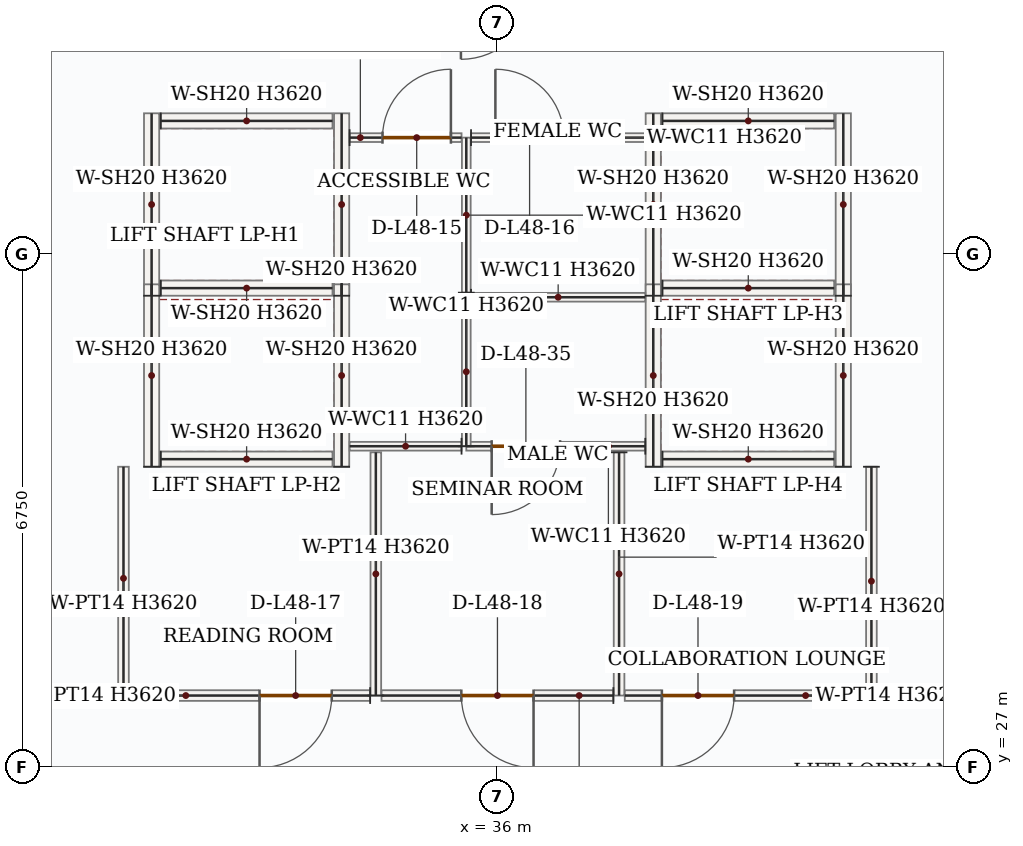
"""IFC4 building model, lengths in metres.
Left out: names, types, materials, properties, quantities, classifications, styles, units other than length and angle.
Written with IfcOpenShell. Run it as: python <this file> out.ifc"""

import sys

from ifc_helpers import new_model, si_unit, direction, frame, frame_2d, origin, place, context, subcontext, project, spatial, rectangle, extrude, source, transform, mapped, element, fill, save


model = new_model("IFC4")
c1 = context("Model", 3, precision=1e-05, world=origin(), true_north=direction((0.0, 1.0)))
c2 = subcontext(c1, "Body", "Model", "MODEL_VIEW")
j1 = project(units=[si_unit("LENGTHUNIT", "METRE"), si_unit("PLANEANGLEUNIT", "RADIAN")], contexts=[c1])
p1 = place(None, origin())
s1 = spatial("IfcSite", under=j1, at=p1, CompositionType="ELEMENT")
p2 = place(p1, origin())
s2 = spatial("IfcBuilding", under=s1, at=p2, CompositionType="ELEMENT")
p3 = place(p2, frame((0.0, 0.0, 205.8)))
s3 = spatial("IfcBuildingStorey", under=s2, at=p3, CompositionType="ELEMENT", Elevation=205.8)
m1 = source(origin(), c2, "Body", "SweptSolid", [
    extrude(rectangle(XDim=2.4, YDim=0.2, at=frame_2d((1.2, 0.0))), origin(), (0.0, 0.0, 1.0), 3.62),
])
for number, where, z_axis, x_axis in (
    (1, (31.45, 33.2, 0.0), (0.0, 0.0, 1.0), (0.0, 1.0, 0.0)),
    (2, (33.95, 33.2, 0.0), (0.0, 0.0, 1.0), (0.0, 1.0, 0.0)),
):
    element("IfcWall", number, at=place(p3, frame(where, z_axis=z_axis, x_axis=x_axis)), inside=s3, PredefinedType="SOLIDWALL", context=c2, shape_type="MappedRepresentation", body=[
        mapped(m1, transform((0.0, 0.0, 0.0), x_axis=(1.0, 0.0, 0.0), y_axis=(0.0, 1.0, 0.0), z_axis=(0.0, 0.0, 1.0), scale=1.0)),
    ])
m2 = source(origin(), c2, "Body", "SweptSolid", [
    extrude(rectangle(XDim=2.26, YDim=0.2, at=frame_2d((1.13, 0.0))), origin(), (0.0, 0.0, 1.0), 3.62),
])
for number, where, z_axis, x_axis in (
    (3, (31.57, 33.3, 0.0), (0.0, 0.0, 1.0), (1.0, 0.0, 0.0)),
    (4, (31.57, 35.5, 0.0), (0.0, 0.0, 1.0), (1.0, 0.0, 0.0)),
):
    element("IfcWall", number, at=place(p3, frame(where, z_axis=z_axis, x_axis=x_axis)), inside=s3, PredefinedType="SOLIDWALL", context=c2, shape_type="MappedRepresentation", body=[
        mapped(m2, transform((0.0, 0.0, 0.0), x_axis=(1.0, 0.0, 0.0), y_axis=(0.0, 1.0, 0.0), z_axis=(0.0, 0.0, 1.0), scale=1.0)),
    ])
for number, where, z_axis, x_axis in (
    (5, (31.45, 30.95, 0.0), (0.0, 0.0, 1.0), (0.0, 1.0, 0.0)),
    (6, (33.95, 30.95, 0.0), (0.0, 0.0, 1.0), (0.0, 1.0, 0.0)),
):
    element("IfcWall", number, at=place(p3, frame(where, z_axis=z_axis, x_axis=x_axis)), inside=s3, PredefinedType="SOLIDWALL", context=c2, shape_type="MappedRepresentation", body=[
        mapped(m1, transform((0.0, 0.0, 0.0), x_axis=(1.0, 0.0, 0.0), y_axis=(0.0, 1.0, 0.0), z_axis=(0.0, 0.0, 1.0), scale=1.0)),
    ])
p4 = place(p3, frame((31.57, 31.05, 0.0), z_axis=(0.0, 0.0, 1.0), x_axis=(1.0, 0.0, 0.0)))
e7 = element("IfcWall", 7, at=p4, inside=s3, PredefinedType="SOLIDWALL", context=c2, shape_type="MappedRepresentation", body=[
    mapped(m2, transform((0.0, 0.0, 0.0), x_axis=(1.0, 0.0, 0.0), y_axis=(0.0, 1.0, 0.0), z_axis=(0.0, 0.0, 1.0), scale=1.0)),
])
for number, where, z_axis, x_axis in (
    (8, (38.05, 33.2, 0.0), (0.0, 0.0, 1.0), (0.0, 1.0, 0.0)),
    (9, (40.55, 33.2, 0.0), (0.0, 0.0, 1.0), (0.0, 1.0, 0.0)),
):
    element("IfcWall", number, at=place(p3, frame(where, z_axis=z_axis, x_axis=x_axis)), inside=s3, PredefinedType="SOLIDWALL", context=c2, shape_type="MappedRepresentation", body=[
        mapped(m1, transform((0.0, 0.0, 0.0), x_axis=(1.0, 0.0, 0.0), y_axis=(0.0, 1.0, 0.0), z_axis=(0.0, 0.0, 1.0), scale=1.0)),
    ])
for number, where, z_axis, x_axis in (
    (10, (38.17, 33.3, 0.0), (0.0, 0.0, 1.0), (1.0, 0.0, 0.0)),
    (11, (38.17, 35.5, 0.0), (0.0, 0.0, 1.0), (1.0, 0.0, 0.0)),
):
    element("IfcWall", number, at=place(p3, frame(where, z_axis=z_axis, x_axis=x_axis)), inside=s3, PredefinedType="SOLIDWALL", context=c2, shape_type="MappedRepresentation", body=[
        mapped(m2, transform((0.0, 0.0, 0.0), x_axis=(1.0, 0.0, 0.0), y_axis=(0.0, 1.0, 0.0), z_axis=(0.0, 0.0, 1.0), scale=1.0)),
    ])
for number, where, z_axis, x_axis in (
    (12, (38.05, 30.95, 0.0), (0.0, 0.0, 1.0), (0.0, 1.0, 0.0)),
    (13, (40.55, 30.95, 0.0), (0.0, 0.0, 1.0), (0.0, 1.0, 0.0)),
):
    element("IfcWall", number, at=place(p3, frame(where, z_axis=z_axis, x_axis=x_axis)), inside=s3, PredefinedType="SOLIDWALL", context=c2, shape_type="MappedRepresentation", body=[
        mapped(m1, transform((0.0, 0.0, 0.0), x_axis=(1.0, 0.0, 0.0), y_axis=(0.0, 1.0, 0.0), z_axis=(0.0, 0.0, 1.0), scale=1.0)),
    ])
p5 = place(p3, frame((38.17, 31.05, 0.0), z_axis=(0.0, 0.0, 1.0), x_axis=(1.0, 0.0, 0.0)))
e14 = element("IfcWall", 14, at=p5, inside=s3, PredefinedType="SOLIDWALL", context=c2, shape_type="MappedRepresentation", body=[
    mapped(m2, transform((0.0, 0.0, 0.0), x_axis=(1.0, 0.0, 0.0), y_axis=(0.0, 1.0, 0.0), z_axis=(0.0, 0.0, 1.0), scale=1.0)),
])
p6 = place(p3, frame((37.945, 31.22, 0.0), z_axis=(0.0, 0.0, 1.0), x_axis=(-1.0, 0.0, 0.0)))
e15 = element("IfcWall", 15, at=p6, inside=s3, PredefinedType="PARTITIONING", context=c2, shape_type="SweptSolid", body=[
    extrude(rectangle(XDim=2.355, YDim=0.115, at=frame_2d((1.177, 0.0))), origin(), (0.0, 0.0, 1.0), 3.62),
])
p7 = place(p6, frame((1.121, 0.0, 0.0)))
e16 = element("IfcOpeningElement", 16, at=p7, cuts=e15, PredefinedType="OPENING", context=c2, shape_type="SweptSolid", body=[
    extrude(rectangle(XDim=0.9, YDim=2.1, at=frame_2d((0.45, 1.05))), frame((0.0, 0.067, 0.0), z_axis=(0.0, -1.0, 0.0), x_axis=(1.0, 0.0, 0.0)), (0.0, 0.0, 1.0), 0.135),
])
m3 = source(origin(), c2, "Body", "SweptSolid", [
    extrude(rectangle(XDim=1.96, YDim=0.115, at=frame_2d((0.98, 0.0))), origin(), (0.0, 0.0, 1.0), 3.62),
])
p8 = place(p3, frame((35.59, 31.22, 0.0), z_axis=(0.0, 0.0, 1.0), x_axis=(0.0, 1.0, 0.0)))
e17 = element("IfcWall", 17, at=p8, inside=s3, PredefinedType="PARTITIONING", context=c2, shape_type="MappedRepresentation", body=[
    mapped(m3, transform((0.0, 0.0, 0.0), x_axis=(1.0, 0.0, 0.0), y_axis=(0.0, 1.0, 0.0), z_axis=(0.0, 0.0, 1.0), scale=1.0)),
])
m4 = source(origin(), c2, "Body", "SweptSolid", [
    extrude(rectangle(XDim=2.292, YDim=0.115, at=frame_2d((1.146, 0.0))), origin(), (0.0, 0.0, 1.0), 3.62),
])
p9 = place(p3, frame((35.653, 33.18, 0.0), z_axis=(0.0, 0.0, 1.0), x_axis=(1.0, 0.0, 0.0)))
e18 = element("IfcWall", 18, at=p9, inside=s3, PredefinedType="PARTITIONING", context=c2, shape_type="MappedRepresentation", body=[
    mapped(m4, transform((0.0, 0.0, 0.0), x_axis=(1.0, 0.0, 0.0), y_axis=(0.0, 1.0, 0.0), z_axis=(0.0, 0.0, 1.0), scale=1.0)),
])
m5 = source(origin(), c2, "Body", "SweptSolid", [
    extrude(rectangle(XDim=2.04, YDim=0.115, at=frame_2d((1.02, 0.0))), origin(), (0.0, 0.0, 1.0), 3.62),
])
p10 = place(p3, frame((35.59, 33.24, 0.0), z_axis=(0.0, 0.0, 1.0), x_axis=(0.0, 1.0, 0.0)))
e19 = element("IfcWall", 19, at=p10, inside=s3, PredefinedType="PARTITIONING", context=c2, shape_type="MappedRepresentation", body=[
    mapped(m5, transform((0.0, 0.0, 0.0), x_axis=(1.0, 0.0, 0.0), y_axis=(0.0, 1.0, 0.0), z_axis=(0.0, 0.0, 1.0), scale=1.0)),
])
p11 = place(p3, frame((35.653, 35.28, 0.0), z_axis=(0.0, 0.0, 1.0), x_axis=(1.0, 0.0, 0.0)))
e20 = element("IfcWall", 20, at=p11, inside=s3, PredefinedType="PARTITIONING", context=c2, shape_type="SweptSolid", body=[
    extrude(rectangle(XDim=2.292, YDim=0.115, at=frame_2d((1.146, 0.0))), origin(), (0.0, 0.0, 1.0), 3.62),
])
p12 = place(p11, frame((0.32, 0.0, 0.0)))
e21 = element("IfcOpeningElement", 21, at=p12, cuts=e20, PredefinedType="OPENING", context=c2, shape_type="SweptSolid", body=[
    extrude(rectangle(XDim=0.9, YDim=2.1, at=frame_2d((0.45, 1.05))), frame((0.0, 0.067, 0.0), z_axis=(0.0, -1.0, 0.0), x_axis=(1.0, 0.0, 0.0)), (0.0, 0.0, 1.0), 0.135),
])
m6 = source(origin(), c2, "Body", "SweptSolid", [
    extrude(rectangle(XDim=1.473, YDim=0.115, at=frame_2d((0.736, 0.0))), origin(), (0.0, 0.0, 1.0), 3.62),
])
p13 = place(p3, frame((35.528, 31.22, 0.0), z_axis=(0.0, 0.0, 1.0), x_axis=(-1.0, 0.0, 0.0)))
e22 = element("IfcWall", 22, at=p13, inside=s3, PredefinedType="PARTITIONING", context=c2, shape_type="MappedRepresentation", body=[
    mapped(m6, transform((0.0, 0.0, 0.0), x_axis=(1.0, 0.0, 0.0), y_axis=(0.0, 1.0, 0.0), z_axis=(0.0, 0.0, 1.0), scale=1.0)),
])
p14 = place(p3, frame((34.055, 35.28, 0.0), z_axis=(0.0, 0.0, 1.0), x_axis=(1.0, 0.0, 0.0)))
e23 = element("IfcWall", 23, at=p14, inside=s3, PredefinedType="PARTITIONING", context=c2, shape_type="SweptSolid", body=[
    extrude(rectangle(XDim=1.473, YDim=0.115, at=frame_2d((0.736, 0.0))), origin(), (0.0, 0.0, 1.0), 3.62),
])
p15 = place(p14, frame((0.433, 0.0, 0.0)))
e24 = element("IfcOpeningElement", 24, at=p15, cuts=e23, PredefinedType="OPENING", context=c2, shape_type="SweptSolid", body=[
    extrude(rectangle(XDim=0.9, YDim=2.1, at=frame_2d((0.45, 1.05))), frame((0.0, 0.067, 0.0), z_axis=(0.0, -1.0, 0.0), x_axis=(1.0, 0.0, 0.0)), (0.0, 0.0, 1.0), 0.135),
])
m7 = source(origin(), c2, "Body", "SweptSolid", [
    extrude(rectangle(XDim=3.2, YDim=0.14, at=frame_2d((1.6, 0.0))), origin(), (0.0, 0.0, 1.0), 3.62),
])
for number, where, z_axis, x_axis in (
    (25, (34.4, 27.94, 0.0), (0.0, 0.0, 1.0), (0.0, 1.0, 0.0)),
    (26, (37.6, 31.14, 0.0), (0.0, 0.0, 1.0), (0.0, -1.0, 0.0)),
):
    element("IfcWall", number, at=place(p3, frame(where, z_axis=z_axis, x_axis=x_axis)), inside=s3, PredefinedType="PARTITIONING", context=c2, shape_type="MappedRepresentation", body=[
        mapped(m7, transform((0.0, 0.0, 0.0), x_axis=(1.0, 0.0, 0.0), y_axis=(0.0, 1.0, 0.0), z_axis=(0.0, 0.0, 1.0), scale=1.0)),
    ])
p16 = place(p3, frame((37.525, 27.94, 0.0), z_axis=(0.0, 0.0, 1.0), x_axis=(-1.0, 0.0, 0.0)))
e27 = element("IfcWall", 27, at=p16, inside=s3, PredefinedType="PARTITIONING", context=c2, shape_type="SweptSolid", body=[
    extrude(rectangle(XDim=3.05, YDim=0.14, at=frame_2d((1.525, 0.0))), origin(), (0.0, 0.0, 1.0), 3.62),
])
p17 = place(p16, frame((1.05, 0.0, 0.0)))
e28 = element("IfcOpeningElement", 28, at=p17, cuts=e27, PredefinedType="OPENING", context=c2, shape_type="SweptSolid", body=[
    extrude(rectangle(XDim=0.95, YDim=2.15, at=frame_2d((0.475, 1.075))), frame((0.0, 0.08, 0.0), z_axis=(0.0, -1.0, 0.0), x_axis=(1.0, 0.0, 0.0)), (0.0, 0.0, 1.0), 0.16),
])
p18 = place(p3, frame((34.325, 27.94, 0.0), z_axis=(0.0, 0.0, 1.0), x_axis=(-1.0, 0.0, 0.0)))
e29 = element("IfcWall", 29, at=p18, inside=s3, PredefinedType="PARTITIONING", context=c2, shape_type="SweptSolid", body=[
    extrude(rectangle(XDim=3.245, YDim=0.14, at=frame_2d((1.623, 0.0))), origin(), (0.0, 0.0, 1.0), 3.62),
])
p19 = place(p18, frame((0.505, 0.0, 0.0)))
e30 = element("IfcOpeningElement", 30, at=p19, cuts=e29, PredefinedType="OPENING", context=c2, shape_type="SweptSolid", body=[
    extrude(rectangle(XDim=0.95, YDim=2.15, at=frame_2d((0.475, 1.075))), frame((0.0, 0.08, 0.0), z_axis=(0.0, -1.0, 0.0), x_axis=(1.0, 0.0, 0.0)), (0.0, 0.0, 1.0), 0.16),
])
m8 = source(origin(), c2, "Body", "SweptSolid", [
    extrude(rectangle(XDim=2.935, YDim=0.14, at=frame_2d((1.468, 0.0))), origin(), (0.0, 0.0, 1.0), 3.62),
])
p20 = place(p3, frame((31.08, 28.015, 0.0), z_axis=(0.0, 0.0, 1.0), x_axis=(0.0, 1.0, 0.0)))
e31 = element("IfcWall", 31, at=p20, inside=s3, PredefinedType="PARTITIONING", context=c2, shape_type="MappedRepresentation", body=[
    mapped(m8, transform((0.0, 0.0, 0.0), x_axis=(1.0, 0.0, 0.0), y_axis=(0.0, 1.0, 0.0), z_axis=(0.0, 0.0, 1.0), scale=1.0)),
])
m9 = source(origin(), c2, "Body", "SweptSolid", [
    extrude(rectangle(XDim=3.01, YDim=0.14, at=frame_2d((1.505, 0.0))), origin(), (0.0, 0.0, 1.0), 3.62),
])
p21 = place(p3, frame((40.92, 30.95, 0.0), z_axis=(0.0, 0.0, 1.0), x_axis=(0.0, -1.0, 0.0)))
e32 = element("IfcWall", 32, at=p21, inside=s3, PredefinedType="PARTITIONING", context=c2, shape_type="MappedRepresentation", body=[
    mapped(m9, transform((0.0, 0.0, 0.0), x_axis=(1.0, 0.0, 0.0), y_axis=(0.0, 1.0, 0.0), z_axis=(0.0, 0.0, 1.0), scale=1.0)),
])
p22 = place(p3, frame((40.845, 27.94, 0.0), z_axis=(0.0, 0.0, 1.0), x_axis=(-1.0, 0.0, 0.0)))
e33 = element("IfcWall", 33, at=p22, inside=s3, PredefinedType="PARTITIONING", context=c2, shape_type="SweptSolid", body=[
    extrude(rectangle(XDim=3.17, YDim=0.14, at=frame_2d((1.585, 0.0))), origin(), (0.0, 0.0, 1.0), 3.62),
])
p23 = place(p22, frame((1.732, 0.0, 0.0)))
e34 = element("IfcOpeningElement", 34, at=p23, cuts=e33, PredefinedType="OPENING", context=c2, shape_type="SweptSolid", body=[
    extrude(rectangle(XDim=0.95, YDim=2.15, at=frame_2d((0.475, 1.075))), frame((0.0, 0.08, 0.0), z_axis=(0.0, -1.0, 0.0), x_axis=(1.0, 0.0, 0.0)), (0.0, 0.0, 1.0), 0.16),
])
m10 = source(origin(), c2, "Body", "SweptSolid", [
    extrude(rectangle(XDim=0.9, YDim=2.1, at=frame_2d((0.45, 1.05))), frame((0.0, 0.025, 0.0), z_axis=(0.0, -1.0, 0.0), x_axis=(1.0, 0.0, 0.0)), (0.0, 0.0, 1.0), 0.05),
])
p24 = place(p15, origin())
e35 = element("IfcDoor", 35, at=p24, inside=s3, OperationType="SINGLE_SWING_RIGHT", PredefinedType="DOOR", context=c2, shape_type="MappedRepresentation", body=[
    mapped(m10, transform((0.0, 0.0, 0.0), x_axis=(1.0, 0.0, 0.0), y_axis=(0.0, 1.0, 0.0), z_axis=(0.0, 0.0, 1.0), scale=1.0)),
])
fill(e24, e35)
p25 = place(p12, origin())
e36 = element("IfcDoor", 36, at=p25, inside=s3, OperationType="SINGLE_SWING_LEFT", PredefinedType="DOOR", context=c2, shape_type="MappedRepresentation", body=[
    mapped(m10, transform((0.0, 0.0, 0.0), x_axis=(1.0, 0.0, 0.0), y_axis=(0.0, 1.0, 0.0), z_axis=(0.0, 0.0, 1.0), scale=1.0)),
])
fill(e21, e36)
m11 = source(origin(), c2, "Body", "SweptSolid", [
    extrude(rectangle(XDim=0.95, YDim=2.15, at=frame_2d((0.475, 1.075))), frame((0.0, 0.025, 0.0), z_axis=(0.0, -1.0, 0.0), x_axis=(1.0, 0.0, 0.0)), (0.0, 0.0, 1.0), 0.05),
])
p26 = place(p19, origin())
e37 = element("IfcDoor", 37, at=p26, inside=s3, OperationType="SINGLE_SWING_RIGHT", PredefinedType="DOOR", context=c2, shape_type="MappedRepresentation", body=[
    mapped(m11, transform((0.0, 0.0, 0.0), x_axis=(1.0, 0.0, 0.0), y_axis=(0.0, 1.0, 0.0), z_axis=(0.0, 0.0, 1.0), scale=1.0)),
])
fill(e30, e37)
p27 = place(p17, origin())
e38 = element("IfcDoor", 38, at=p27, inside=s3, OperationType="SINGLE_SWING_LEFT", PredefinedType="DOOR", context=c2, shape_type="MappedRepresentation", body=[
    mapped(m11, transform((0.0, 0.0, 0.0), x_axis=(1.0, 0.0, 0.0), y_axis=(0.0, 1.0, 0.0), z_axis=(0.0, 0.0, 1.0), scale=1.0)),
])
fill(e28, e38)
p28 = place(p23, origin())
e39 = element("IfcDoor", 39, at=p28, inside=s3, OperationType="SINGLE_SWING_RIGHT", PredefinedType="DOOR", context=c2, shape_type="MappedRepresentation", body=[
    mapped(m11, transform((0.0, 0.0, 0.0), x_axis=(1.0, 0.0, 0.0), y_axis=(0.0, 1.0, 0.0), z_axis=(0.0, 0.0, 1.0), scale=1.0)),
])
fill(e34, e39)
p29 = place(p7, origin())
e40 = element("IfcDoor", 40, at=p29, inside=s3, OperationType="SINGLE_SWING_RIGHT", PredefinedType="DOOR", context=c2, shape_type="MappedRepresentation", body=[
    mapped(m10, transform((0.0, 0.0, 0.0), x_axis=(1.0, 0.0, 0.0), y_axis=(0.0, 1.0, 0.0), z_axis=(0.0, 0.0, 1.0), scale=1.0)),
])
fill(e16, e40)
save(model, sys.argv[1])
